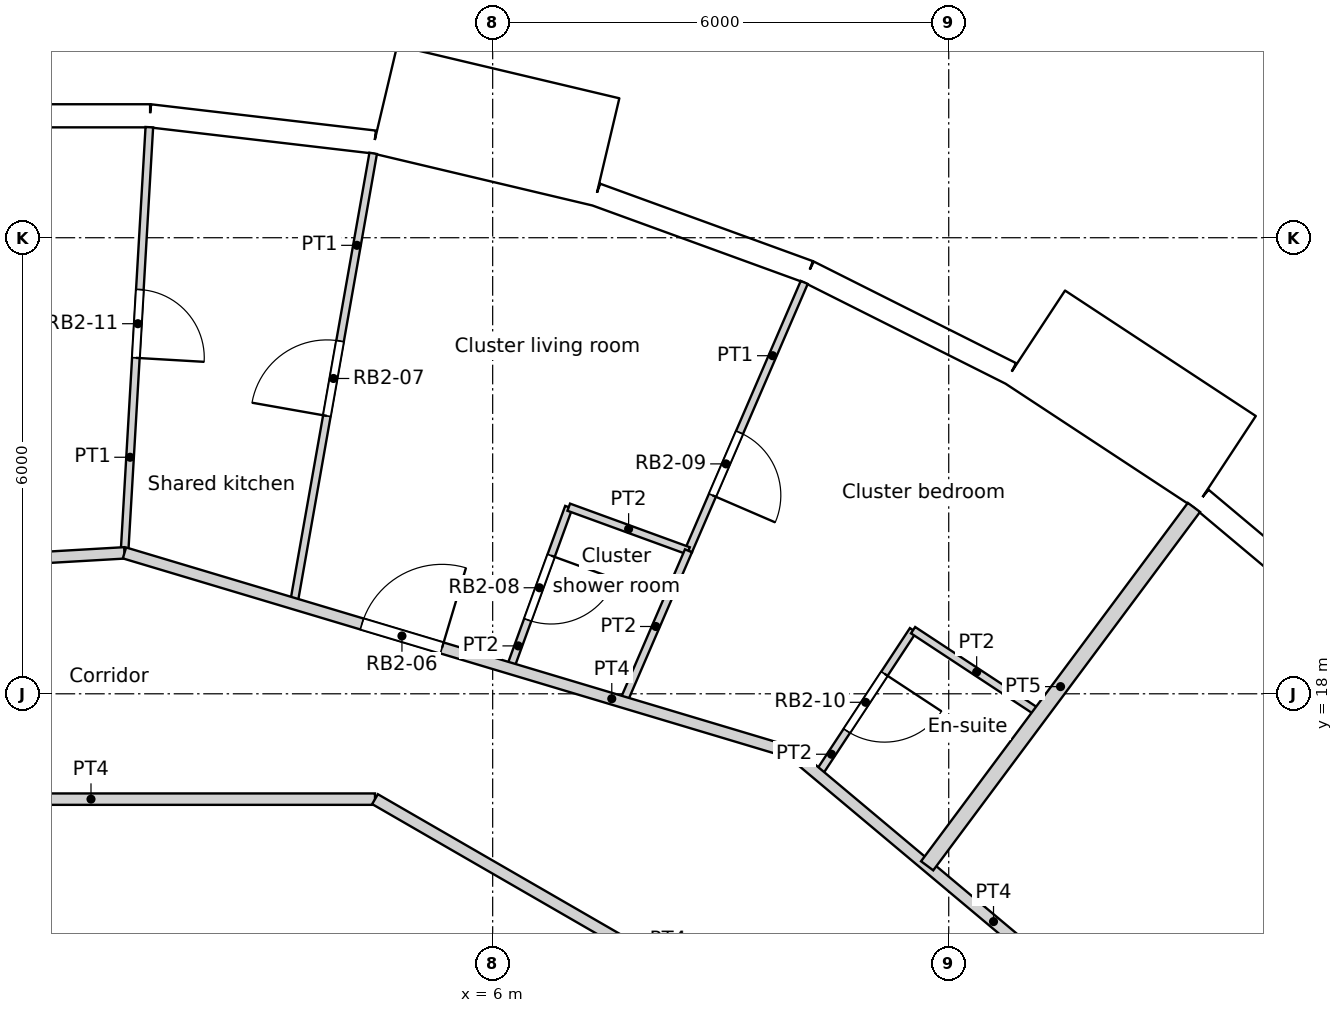
"""IFC4 building model, lengths in metres.
Left out: names, types, materials, properties, quantities, classifications, styles, units other than length and angle.
Written with IfcOpenShell. Run it as: python <this file> out.ifc"""

import sys

from ifc_helpers import new_model, si_unit, direction, frame, frame_2d, origin, origin_2d, place, context, subcontext, project, spatial, rectangle, circle, extrude, element, fill, save


model = new_model("IFC4")
c1 = context("Model", 3, precision=1e-05, world=origin(), true_north=direction((0.0, 1.0)))
c2 = subcontext(c1, "Body", "Model", "MODEL_VIEW")
j1 = project(units=[si_unit("LENGTHUNIT", "METRE"), si_unit("PLANEANGLEUNIT", "RADIAN")], contexts=[c1])
p1 = place(None, origin())
s1 = spatial("IfcSite", under=j1, at=p1, CompositionType="ELEMENT")
p2 = place(p1, origin())
s2 = spatial("IfcBuilding", under=s1, at=p2, CompositionType="ELEMENT")
p3 = place(p2, frame((0.0, 0.0, 136.8)))
s3 = spatial("IfcBuildingStorey", under=s2, at=p3, CompositionType="ELEMENT", Elevation=136.8)
for number, where, z_axis, x_axis in (
    (1, (14.659, 19.69, 0.0), (0.0, 0.0, 1.0), (1.0, 0.0, 0.0)),
    (2, (9.723, 22.54, 0.0), (0.0, 0.0, 1.0), (1.0, 0.0, 0.0)),
    (3, (4.263, 24.175, 0.0), (0.0, 0.0, 1.0), (1.0, 0.0, 0.0)),
):
    element("IfcColumn", number, at=place(p3, frame(where, z_axis=z_axis, x_axis=x_axis)), inside=s3, PredefinedType="COLUMN", context=c2, shape_type="SweptSolid", body=[
        extrude(circle(Radius=0.6, at=origin_2d()), origin(), (0.0, 0.0, 1.0), 3.6),
    ])
for number, where, z_axis, x_axis in (
    (4, (11.735, 14.716, 0.0), (0.0, 0.0, 1.0), (1.0, 0.0, 0.0)),
    (5, (6.876, 17.521, 0.0), (0.0, 0.0, 1.0), (1.0, 0.0, 0.0)),
    (6, (1.406, 18.77, 0.0), (0.0, 0.0, 1.0), (1.0, 0.0, 0.0)),
):
    element("IfcColumn", number, at=place(p3, frame(where, z_axis=z_axis, x_axis=x_axis)), inside=s3, PredefinedType="COLUMN", context=c2, shape_type="SweptSolid", body=[
        extrude(circle(Radius=0.65, at=origin_2d()), origin(), (0.0, 0.0, 1.0), 3.6),
    ])
p4 = place(p3, frame((17.6, 18.655, 0.0), z_axis=(0.0, 0.0, 1.0), x_axis=(-0.766049350637, 0.642781761089, 0.0)))
e7 = element("IfcWall", 7, at=p4, inside=s3, PredefinedType="SOLIDWALL", context=c2, shape_type="SweptSolid", body=[
    extrude(rectangle(XDim=2.973, YDim=0.3, at=frame_2d((1.486, 0.0))), origin(), (0.0, 0.0, 1.0), 3.3),
])
p5 = place(p4, frame((1.486, 0.0, 1.55)))
e8 = element("IfcOpeningElement", 8, at=p5, cuts=e7, PredefinedType="OPENING", context=c2, shape_type="SweptSolid", body=[
    extrude(circle(Radius=0.9, at=origin_2d()), frame((0.0, 0.16, 0.0), z_axis=(0.0, -1.0, 0.0), x_axis=(1.0, 0.0, 0.0)), (0.0, 0.0, 1.0), 0.32),
])
p6 = place(p3, frame((15.639, 21.048, -0.3), z_axis=(0.0, 0.0, 1.0), x_axis=(-0.835514416706, 0.549468524554, 0.0)))
e9 = element("IfcWall", 9, at=p6, inside=s3, PredefinedType="ELEMENTEDWALL", context=c2, shape_type="SweptSolid", body=[
    extrude(rectangle(XDim=3.0, YDim=1.45, at=frame_2d((1.5, 0.0))), origin(), (0.0, 0.0, 1.0), 3.6),
])
p7 = place(p6, frame((1.5, 0.0, 1.85)))
e10 = element("IfcOpeningElement", 10, at=p7, cuts=e9, PredefinedType="OPENING", context=c2, shape_type="SweptSolid", body=[
    extrude(circle(Radius=0.9, at=origin_2d()), frame((0.0, 0.735, 0.0), z_axis=(0.0, -1.0, 0.0), x_axis=(1.0, 0.0, 0.0)), (0.0, 0.0, 1.0), 1.47),
])
p8 = place(p3, frame((12.815, 22.216, 0.0), z_axis=(0.0, 0.0, 1.0), x_axis=(-0.893637442555, 0.448789618045, 0.0)))
e11 = element("IfcWall", 11, at=p8, inside=s3, PredefinedType="SOLIDWALL", context=c2, shape_type="SweptSolid", body=[
    extrude(rectangle(XDim=2.973, YDim=0.3, at=frame_2d((1.486, 0.0))), origin(), (0.0, 0.0, 1.0), 2.8),
])
p9 = place(p8, frame((1.486, 0.0, 1.55)))
e12 = element("IfcOpeningElement", 12, at=p9, cuts=e11, PredefinedType="OPENING", context=c2, shape_type="SweptSolid", body=[
    extrude(circle(Radius=0.9, at=origin_2d()), frame((0.0, 0.16, 0.0), z_axis=(0.0, -1.0, 0.0), x_axis=(1.0, 0.0, 0.0)), (0.0, 0.0, 1.0), 0.32),
])
p10 = place(p3, frame((10.158, 23.55, 0.0), z_axis=(0.0, 0.0, 1.0), x_axis=(-0.939690282133, 0.342026568652, 0.0)))
e13 = element("IfcWall", 13, at=p10, inside=s3, PredefinedType="SOLIDWALL", context=c2, shape_type="SweptSolid", body=[
    extrude(rectangle(XDim=2.973, YDim=0.3, at=frame_2d((1.486, 0.0))), origin(), (0.0, 0.0, 1.0), 3.3),
])
p11 = place(p10, frame((1.486, 0.0, 1.55)))
e14 = element("IfcOpeningElement", 14, at=p11, cuts=e13, PredefinedType="OPENING", context=c2, shape_type="SweptSolid", body=[
    extrude(circle(Radius=0.9, at=origin_2d()), frame((0.0, 0.16, 0.0), z_axis=(0.0, -1.0, 0.0), x_axis=(1.0, 0.0, 0.0)), (0.0, 0.0, 1.0), 0.32),
])
p12 = place(p3, frame((7.497, 25.127, -0.3), z_axis=(0.0, 0.0, 1.0), x_axis=(-0.973042333261, 0.23062657627, 0.0)))
e15 = element("IfcWall", 15, at=p12, inside=s3, PredefinedType="ELEMENTEDWALL", context=c2, shape_type="SweptSolid", body=[
    extrude(rectangle(XDim=3.0, YDim=1.45, at=frame_2d((1.5, 0.0))), origin(), (0.0, 0.0, 1.0), 3.6),
])
p13 = place(p12, frame((1.5, 0.0, 1.85)))
e16 = element("IfcOpeningElement", 16, at=p13, cuts=e15, PredefinedType="OPENING", context=c2, shape_type="SweptSolid", body=[
    extrude(circle(Radius=0.9, at=origin_2d()), frame((0.0, 0.735, 0.0), z_axis=(0.0, -1.0, 0.0), x_axis=(1.0, 0.0, 0.0)), (0.0, 0.0, 1.0), 1.47),
])
p14 = place(p3, frame((4.444, 25.259, 0.0), z_axis=(0.0, 0.0, 1.0), x_axis=(-0.993245010522, 0.1160359818, 0.0)))
e17 = element("IfcWall", 17, at=p14, inside=s3, PredefinedType="SOLIDWALL", context=c2, shape_type="SweptSolid", body=[
    extrude(rectangle(XDim=2.973, YDim=0.3, at=frame_2d((1.486, 0.0))), origin(), (0.0, 0.0, 1.0), 2.8),
])
p15 = place(p14, frame((1.486, 0.0, 1.55)))
e18 = element("IfcOpeningElement", 18, at=p15, cuts=e17, PredefinedType="OPENING", context=c2, shape_type="SweptSolid", body=[
    extrude(circle(Radius=0.9, at=origin_2d()), frame((0.0, 0.16, 0.0), z_axis=(0.0, -1.0, 0.0), x_axis=(1.0, 0.0, 0.0)), (0.0, 0.0, 1.0), 0.32),
])
p16 = place(p3, frame((1.491, 25.604, 0.0), z_axis=(0.0, 0.0, 1.0), x_axis=(-1.0, 0.0, 0.0)))
e19 = element("IfcWall", 19, at=p16, inside=s3, PredefinedType="SOLIDWALL", context=c2, shape_type="SweptSolid", body=[
    extrude(rectangle(XDim=2.973, YDim=0.3, at=frame_2d((1.486, 0.0))), origin(), (0.0, 0.0, 1.0), 3.3),
])
p17 = place(p16, frame((1.486, 0.0, 1.55)))
e20 = element("IfcOpeningElement", 20, at=p17, cuts=e19, PredefinedType="OPENING", context=c2, shape_type="SweptSolid", body=[
    extrude(circle(Radius=0.9, at=origin_2d()), frame((0.0, 0.16, 0.0), z_axis=(0.0, -1.0, 0.0), x_axis=(1.0, 0.0, 0.0)), (0.0, 0.0, 1.0), 0.32),
])
p18 = place(p3, frame((9.943, 17.222, 0.0), z_axis=(0.0, 0.0, 1.0), x_axis=(0.766192104565, -0.642611592567, 0.0)))
e21 = element("IfcWall", 21, at=p18, inside=s3, PredefinedType="PARTITIONING", context=c2, shape_type="SweptSolid", body=[
    extrude(rectangle(XDim=6.906, YDim=0.15, at=frame_2d((3.453, 0.0))), origin(), (0.0, 0.0, 1.0), 3.3),
])
p19 = place(p3, frame((4.452, 16.614, 0.0), z_axis=(0.0, 0.0, 1.0), x_axis=(0.866005203721, -0.500034985904, 0.0)))
e22 = element("IfcWall", 22, at=p19, inside=s3, PredefinedType="PARTITIONING", context=c2, shape_type="SweptSolid", body=[
    extrude(rectangle(XDim=8.903, YDim=0.15, at=frame_2d((4.452, 0.0))), origin(), (0.0, 0.0, 1.0), 3.3),
])
p20 = place(p3, frame((-3.021, 16.614, 0.0), z_axis=(0.0, 0.0, 1.0), x_axis=(1.0, 0.0, 0.0)))
e23 = element("IfcWall", 23, at=p20, inside=s3, PredefinedType="PARTITIONING", context=c2, shape_type="SweptSolid", body=[
    extrude(rectangle(XDim=7.473, YDim=0.15, at=frame_2d((3.736, 0.0))), origin(), (0.0, 0.0, 1.0), 3.3),
])
p21 = place(p3, frame((1.156, 19.853, 0.0), z_axis=(0.0, 0.0, 1.0), x_axis=(0.958024563008, -0.286686129197, 0.0)))
e24 = element("IfcWall", 24, at=p21, inside=s3, PredefinedType="PARTITIONING", context=c2, shape_type="SweptSolid", body=[
    extrude(rectangle(XDim=9.173, YDim=0.15, at=frame_2d((4.587, 0.0))), origin(), (0.0, 0.0, 1.0), 3.3),
])
p22 = place(p21, frame((3.26, 0.0, 0.0)))
e25 = element("IfcOpeningElement", 25, at=p22, cuts=e24, PredefinedType="OPENING", context=c2, shape_type="SweptSolid", body=[
    extrude(rectangle(XDim=1.1, YDim=2.1, at=frame_2d((0.55, 1.05))), frame((0.0, 0.075, 0.0), z_axis=(0.0, -1.0, 0.0), x_axis=(1.0, 0.0, 0.0)), (0.0, 0.0, 1.0), 0.15),
])
p23 = place(p3, frame((-3.453, 19.586, 0.0), z_axis=(0.0, 0.0, 1.0), x_axis=(0.998318940977, 0.057959400324, 0.0)))
e26 = element("IfcWall", 26, at=p23, inside=s3, PredefinedType="PARTITIONING", context=c2, shape_type="SweptSolid", body=[
    extrude(rectangle(XDim=4.617, YDim=0.15, at=frame_2d((2.308, 0.0))), origin(), (0.0, 0.0, 1.0), 3.3),
])
p24 = place(p3, frame((11.716, 15.737, 0.0), z_axis=(0.0, 0.0, 1.0), x_axis=(0.597131981171, 0.802143002876, 0.0)))
e27 = element("IfcWall", 27, at=p24, inside=s3, PredefinedType="PARTITIONING", context=c2, shape_type="SweptSolid", body=[
    extrude(rectangle(XDim=5.878, YDim=0.2, at=frame_2d((2.939, 0.0))), origin(), (0.0, 0.0, 1.0), 3.3),
])
p25 = place(p3, frame((3.383, 19.187, 0.0), z_axis=(0.0, 0.0, 1.0), x_axis=(0.173732074199, 0.984792956105, 0.0)))
e28 = element("IfcWall", 28, at=p25, inside=s3, PredefinedType="PARTITIONING", context=c2, shape_type="SweptSolid", body=[
    extrude(rectangle(XDim=6.015, YDim=0.1, at=frame_2d((3.007, 0.0))), origin(), (0.0, 0.0, 1.0), 3.3),
])
p26 = place(p25, frame((2.507, 0.0, 0.0)))
e29 = element("IfcOpeningElement", 29, at=p26, cuts=e28, PredefinedType="OPENING", context=c2, shape_type="SweptSolid", body=[
    extrude(rectangle(XDim=1.0, YDim=2.04, at=frame_2d((0.5, 1.02))), frame((0.0, 0.05, 0.0), z_axis=(0.0, -1.0, 0.0), x_axis=(1.0, 0.0, 0.0)), (0.0, 0.0, 1.0), 0.1),
])
p27 = place(p3, frame((7.001, 20.455, 0.0), z_axis=(0.0, 0.0, 1.0), x_axis=(0.939550801119, -0.342409538588, 0.0)))
e30 = element("IfcWall", 30, at=p27, inside=s3, PredefinedType="PARTITIONING", context=c2, shape_type="SweptSolid", body=[
    extrude(rectangle(XDim=1.676, YDim=0.1, at=frame_2d((0.838, 0.0))), origin(), (0.0, 0.0, 1.0), 3.3),
])
p28 = place(p3, frame((6.229, 18.335, 0.0), z_axis=(0.0, 0.0, 1.0), x_axis=(0.342142678062, 0.939648012741, 0.0)))
e31 = element("IfcWall", 31, at=p28, inside=s3, PredefinedType="PARTITIONING", context=c2, shape_type="SweptSolid", body=[
    extrude(rectangle(XDim=2.256, YDim=0.1, at=frame_2d((1.128, 0.0))), origin(), (0.0, 0.0, 1.0), 3.3),
])
p29 = place(p28, frame((0.678, 0.0, 0.0)))
e32 = element("IfcOpeningElement", 32, at=p29, cuts=e31, PredefinedType="OPENING", context=c2, shape_type="SweptSolid", body=[
    extrude(rectangle(XDim=0.9, YDim=2.0, at=frame_2d((0.45, 1.0))), frame((0.0, 0.05, 0.0), z_axis=(0.0, -1.0, 0.0), x_axis=(1.0, 0.0, 0.0)), (0.0, 0.0, 1.0), 0.1),
])
p30 = place(p3, frame((8.576, 19.881, 0.0), z_axis=(0.0, 0.0, 1.0), x_axis=(0.396094260049, 0.918209854639, 0.0)))
e33 = element("IfcWall", 33, at=p30, inside=s3, PredefinedType="PARTITIONING", context=c2, shape_type="SweptSolid", body=[
    extrude(rectangle(XDim=3.845, YDim=0.1, at=frame_2d((1.923, 0.0))), origin(), (0.0, 0.0, 1.0), 3.3),
])
p31 = place(p30, frame((0.795, 0.0, 0.0)))
e34 = element("IfcOpeningElement", 34, at=p31, cuts=e33, PredefinedType="OPENING", context=c2, shape_type="SweptSolid", body=[
    extrude(rectangle(XDim=0.9, YDim=2.1, at=frame_2d((0.45, 1.05))), frame((0.0, 0.05, 0.0), z_axis=(0.0, -1.0, 0.0), x_axis=(1.0, 0.0, 0.0)), (0.0, 0.0, 1.0), 0.1),
])
p32 = place(p3, frame((1.156, 19.854, 0.0), z_axis=(0.0, 0.0, 1.0), x_axis=(0.058275543564, 0.998300536423, 0.0)))
e35 = element("IfcWall", 35, at=p32, inside=s3, PredefinedType="PARTITIONING", context=c2, shape_type="SweptSolid", body=[
    extrude(rectangle(XDim=5.61, YDim=0.1, at=frame_2d((2.805, 0.0))), origin(), (0.0, 0.0, 1.0), 3.3),
])
p33 = place(p32, frame((2.57, 0.0, 0.0)))
e36 = element("IfcOpeningElement", 36, at=p33, cuts=e35, PredefinedType="OPENING", context=c2, shape_type="SweptSolid", body=[
    extrude(rectangle(XDim=0.9, YDim=2.1, at=frame_2d((0.45, 1.05))), frame((0.0, 0.05, 0.0), z_axis=(0.0, -1.0, 0.0), x_axis=(1.0, 0.0, 0.0)), (0.0, 0.0, 1.0), 0.1),
])
p34 = place(p3, frame((7.717, 17.89, 0.0), z_axis=(0.0, 0.0, 1.0), x_axis=(0.396065054916, 0.9182224525, 0.0)))
e37 = element("IfcWall", 37, at=p34, inside=s3, PredefinedType="PARTITIONING", context=c2, shape_type="SweptSolid", body=[
    extrude(rectangle(XDim=2.168, YDim=0.1, at=frame_2d((1.084, 0.0))), origin(), (0.0, 0.0, 1.0), 3.3),
])
p35 = place(p3, frame((11.531, 18.837, 0.0), z_axis=(0.0, 0.0, 1.0), x_axis=(0.835392041163, -0.549654562032, 0.0)))
e38 = element("IfcWall", 38, at=p35, inside=s3, PredefinedType="PARTITIONING", context=c2, shape_type="SweptSolid", body=[
    extrude(rectangle(XDim=2.003, YDim=0.1, at=frame_2d((1.001, 0.0))), origin(), (0.0, 0.0, 1.0), 3.3),
])
p36 = place(p3, frame((10.282, 16.939, 0.0), z_axis=(0.0, 0.0, 1.0), x_axis=(0.549730960803, 0.83534176882, 0.0)))
e39 = element("IfcWall", 39, at=p36, inside=s3, PredefinedType="PARTITIONING", context=c2, shape_type="SweptSolid", body=[
    extrude(rectangle(XDim=2.272, YDim=0.1, at=frame_2d((1.136, 0.0))), origin(), (0.0, 0.0, 1.0), 3.3),
])
p37 = place(p36, frame((0.686, 0.0, 0.0)))
e40 = element("IfcOpeningElement", 40, at=p37, cuts=e39, PredefinedType="OPENING", context=c2, shape_type="SweptSolid", body=[
    extrude(rectangle(XDim=0.9, YDim=2.04, at=frame_2d((0.45, 1.02))), frame((0.0, 0.05, 0.0), z_axis=(0.0, -1.0, 0.0), x_axis=(1.0, 0.0, 0.0)), (0.0, 0.0, 1.0), 0.1),
])
p38 = place(p5, origin())
e41 = element("IfcWindow", 41, at=p38, inside=s3, PartitioningType="SINGLE_PANEL", PredefinedType="WINDOW", context=c2, shape_type="SweptSolid", body=[
    extrude(circle(Radius=0.9, at=origin_2d()), frame((0.0, 0.12, 0.0), z_axis=(0.0, -1.0, 0.0), x_axis=(1.0, 0.0, 0.0)), (0.0, 0.0, 1.0), 0.1),
])
fill(e8, e41)
p39 = place(p7, origin())
e42 = element("IfcWindow", 42, at=p39, inside=s3, PartitioningType="SINGLE_PANEL", PredefinedType="WINDOW", context=c2, shape_type="SweptSolid", body=[
    extrude(circle(Radius=0.9, at=origin_2d()), frame((0.0, 0.695, 0.0), z_axis=(0.0, -1.0, 0.0), x_axis=(1.0, 0.0, 0.0)), (0.0, 0.0, 1.0), 0.1),
])
fill(e10, e42)
p40 = place(p9, origin())
e43 = element("IfcWindow", 43, at=p40, inside=s3, PartitioningType="SINGLE_PANEL", PredefinedType="WINDOW", context=c2, shape_type="SweptSolid", body=[
    extrude(circle(Radius=0.9, at=origin_2d()), frame((0.0, 0.12, 0.0), z_axis=(0.0, -1.0, 0.0), x_axis=(1.0, 0.0, 0.0)), (0.0, 0.0, 1.0), 0.1),
])
fill(e12, e43)
p41 = place(p11, origin())
e44 = element("IfcWindow", 44, at=p41, inside=s3, PartitioningType="SINGLE_PANEL", PredefinedType="WINDOW", context=c2, shape_type="SweptSolid", body=[
    extrude(circle(Radius=0.9, at=origin_2d()), frame((0.0, 0.12, 0.0), z_axis=(0.0, -1.0, 0.0), x_axis=(1.0, 0.0, 0.0)), (0.0, 0.0, 1.0), 0.1),
])
fill(e14, e44)
p42 = place(p13, origin())
e45 = element("IfcWindow", 45, at=p42, inside=s3, PartitioningType="SINGLE_PANEL", PredefinedType="WINDOW", context=c2, shape_type="SweptSolid", body=[
    extrude(circle(Radius=0.9, at=origin_2d()), frame((0.0, 0.695, 0.0), z_axis=(0.0, -1.0, 0.0), x_axis=(1.0, 0.0, 0.0)), (0.0, 0.0, 1.0), 0.1),
])
fill(e16, e45)
p43 = place(p15, origin())
e46 = element("IfcWindow", 46, at=p43, inside=s3, PartitioningType="SINGLE_PANEL", PredefinedType="WINDOW", context=c2, shape_type="SweptSolid", body=[
    extrude(circle(Radius=0.9, at=origin_2d()), frame((0.0, 0.12, 0.0), z_axis=(0.0, -1.0, 0.0), x_axis=(1.0, 0.0, 0.0)), (0.0, 0.0, 1.0), 0.1),
])
fill(e18, e46)
p44 = place(p17, origin())
e47 = element("IfcWindow", 47, at=p44, inside=s3, PartitioningType="SINGLE_PANEL", PredefinedType="WINDOW", context=c2, shape_type="SweptSolid", body=[
    extrude(circle(Radius=0.9, at=origin_2d()), frame((0.0, 0.12, 0.0), z_axis=(0.0, -1.0, 0.0), x_axis=(1.0, 0.0, 0.0)), (0.0, 0.0, 1.0), 0.1),
])
fill(e20, e47)
p45 = place(p22, origin())
e48 = element("IfcDoor", 48, at=p45, inside=s3, OperationType="SINGLE_SWING_RIGHT", PredefinedType="DOOR", context=c2, shape_type="SweptSolid", body=[
    extrude(rectangle(XDim=1.1, YDim=2.1, at=frame_2d((0.55, 1.05))), frame((0.0, 0.025, 0.0), z_axis=(0.0, -1.0, 0.0), x_axis=(1.0, 0.0, 0.0)), (0.0, 0.0, 1.0), 0.05),
])
fill(e25, e48)
p46 = place(p26, origin())
e49 = element("IfcDoor", 49, at=p46, inside=s3, OperationType="SINGLE_SWING_LEFT", PredefinedType="DOOR", context=c2, shape_type="SweptSolid", body=[
    extrude(rectangle(XDim=1.0, YDim=2.04, at=frame_2d((0.5, 1.02))), frame((0.0, 0.025, 0.0), z_axis=(0.0, -1.0, 0.0), x_axis=(1.0, 0.0, 0.0)), (0.0, 0.0, 1.0), 0.05),
])
fill(e29, e49)
p47 = place(p29, origin())
e50 = element("IfcDoor", 50, at=p47, inside=s3, OperationType="SINGLE_SWING_LEFT", PredefinedType="DOOR", context=c2, shape_type="SweptSolid", body=[
    extrude(rectangle(XDim=0.9, YDim=2.0, at=frame_2d((0.45, 1.0))), frame((0.0, 0.025, 0.0), z_axis=(0.0, -1.0, 0.0), x_axis=(1.0, 0.0, 0.0)), (0.0, 0.0, 1.0), 0.05),
])
fill(e32, e50)
p48 = place(p31, origin())
e51 = element("IfcDoor", 51, at=p48, inside=s3, OperationType="SINGLE_SWING_RIGHT", PredefinedType="DOOR", context=c2, shape_type="SweptSolid", body=[
    extrude(rectangle(XDim=0.9, YDim=2.1, at=frame_2d((0.45, 1.05))), frame((0.0, 0.025, 0.0), z_axis=(0.0, -1.0, 0.0), x_axis=(1.0, 0.0, 0.0)), (0.0, 0.0, 1.0), 0.05),
])
fill(e34, e51)
p49 = place(p37, origin())
e52 = element("IfcDoor", 52, at=p49, inside=s3, OperationType="SINGLE_SWING_LEFT", PredefinedType="DOOR", context=c2, shape_type="SweptSolid", body=[
    extrude(rectangle(XDim=0.9, YDim=2.04, at=frame_2d((0.45, 1.02))), frame((0.0, 0.025, 0.0), z_axis=(0.0, -1.0, 0.0), x_axis=(1.0, 0.0, 0.0)), (0.0, 0.0, 1.0), 0.05),
])
fill(e40, e52)
p50 = place(p33, origin())
e53 = element("IfcDoor", 53, at=p50, inside=s3, OperationType="SINGLE_SWING_RIGHT", PredefinedType="DOOR", context=c2, shape_type="SweptSolid", body=[
    extrude(rectangle(XDim=0.9, YDim=2.1, at=frame_2d((0.45, 1.05))), frame((0.0, 0.025, 0.0), z_axis=(0.0, -1.0, 0.0), x_axis=(1.0, 0.0, 0.0)), (0.0, 0.0, 1.0), 0.05),
])
fill(e36, e53)
save(model, sys.argv[1])
